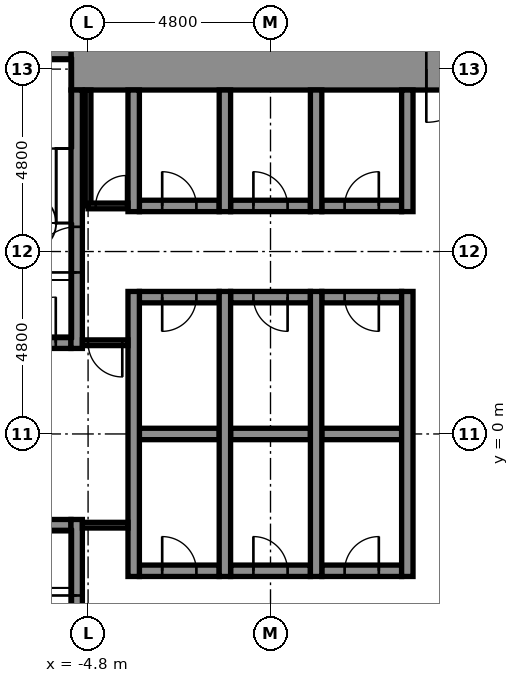
"""IFC4 building model, lengths in metres.
Left out: names, types, materials, properties, quantities, classifications, styles, units other than length and angle.
Written with IfcOpenShell. Run it as: python <this file> out.ifc"""

import sys

from ifc_helpers import new_model, si_unit, direction, frame, frame_2d, origin, place, context, subcontext, project, spatial, rectangle, extrude, element, fill, save


model = new_model("IFC4")
c1 = context("Model", 3, precision=1e-05, world=origin(), true_north=direction((0.0, 1.0)))
c2 = subcontext(c1, "Body", "Model", "MODEL_VIEW")
j1 = project(units=[si_unit("LENGTHUNIT", "METRE"), si_unit("PLANEANGLEUNIT", "RADIAN")], contexts=[c1])
p1 = place(None, origin())
s1 = spatial("IfcSite", under=j1, at=p1, CompositionType="ELEMENT")
p2 = place(p1, origin())
s2 = spatial("IfcBuilding", under=s1, at=p2, CompositionType="ELEMENT")
p3 = place(p2, frame((0.0, 0.0, 12.4)))
s3 = spatial("IfcBuildingStorey", under=s2, at=p3, CompositionType="ELEMENT", Elevation=12.4)
p4 = place(p3, frame((-3.45, -3.6, -0.3), z_axis=(0.0, 0.0, 1.0), x_axis=(1.0, 0.0, 0.0)))
e1 = element("IfcWall", 1, at=p4, inside=s3, PredefinedType="STANDARD", context=c2, shape_type="SweptSolid", body=[
    extrude(rectangle(XDim=2.1, YDim=0.3, at=frame_2d((1.05, 0.0))), origin(), (0.0, 0.0, 1.0), 5.05),
])
p5 = place(p4, frame((0.6, 0.0, 0.3)))
e2 = element("IfcOpeningElement", 2, at=p5, cuts=e1, PredefinedType="OPENING", context=c2, shape_type="SweptSolid", body=[
    extrude(rectangle(XDim=0.9, YDim=2.1, at=frame_2d((0.45, 1.05))), frame((0.0, 0.16, 0.0), z_axis=(0.0, -1.0, 0.0), x_axis=(1.0, 0.0, 0.0)), (0.0, 0.0, 1.0), 0.32),
])
p6 = place(p3, frame((-1.05, -3.6, -0.3), z_axis=(0.0, 0.0, 1.0), x_axis=(1.0, 0.0, 0.0)))
e3 = element("IfcWall", 3, at=p6, inside=s3, PredefinedType="STANDARD", context=c2, shape_type="SweptSolid", body=[
    extrude(rectangle(XDim=2.1, YDim=0.3, at=frame_2d((1.05, 0.0))), origin(), (0.0, 0.0, 1.0), 5.05),
])
p7 = place(p6, frame((0.6, 0.0, 0.3)))
e4 = element("IfcOpeningElement", 4, at=p7, cuts=e3, PredefinedType="OPENING", context=c2, shape_type="SweptSolid", body=[
    extrude(rectangle(XDim=0.9, YDim=2.1, at=frame_2d((0.45, 1.05))), frame((0.0, 0.16, 0.0), z_axis=(0.0, -1.0, 0.0), x_axis=(1.0, 0.0, 0.0)), (0.0, 0.0, 1.0), 0.32),
])
p8 = place(p3, frame((1.35, -3.6, -0.3), z_axis=(0.0, 0.0, 1.0), x_axis=(1.0, 0.0, 0.0)))
e5 = element("IfcWall", 5, at=p8, inside=s3, PredefinedType="STANDARD", context=c2, shape_type="SweptSolid", body=[
    extrude(rectangle(XDim=2.1, YDim=0.3, at=frame_2d((1.05, 0.0))), origin(), (0.0, 0.0, 1.0), 5.05),
])
p9 = place(p8, frame((0.6, 0.0, 0.3)))
e6 = element("IfcOpeningElement", 6, at=p9, cuts=e5, PredefinedType="OPENING", context=c2, shape_type="SweptSolid", body=[
    extrude(rectangle(XDim=0.9, YDim=2.1, at=frame_2d((0.45, 1.05))), frame((0.0, 0.16, 0.0), z_axis=(0.0, -1.0, 0.0), x_axis=(1.0, 0.0, 0.0)), (0.0, 0.0, 1.0), 0.32),
])
p10 = place(p3, frame((-7.25, -2.4, -0.3), z_axis=(0.0, 0.0, 1.0), x_axis=(1.0, 0.0, 0.0)))
e7 = element("IfcWall", 7, at=p10, inside=s3, PredefinedType="STANDARD", context=c2, shape_type="SweptSolid", body=[
    extrude(rectangle(XDim=2.0, YDim=0.3, at=frame_2d((1.0, 0.0))), origin(), (0.0, 0.0, 1.0), 5.05),
])
p11 = place(p3, frame((-3.45, 0.0, -0.3), z_axis=(0.0, 0.0, 1.0), x_axis=(1.0, 0.0, 0.0)))
e8 = element("IfcWall", 8, at=p11, inside=s3, PredefinedType="STANDARD", context=c2, shape_type="SweptSolid", body=[
    extrude(rectangle(XDim=2.1, YDim=0.3, at=frame_2d((1.05, 0.0))), origin(), (0.0, 0.0, 1.0), 5.05),
])
p12 = place(p3, frame((-1.05, 0.0, -0.3), z_axis=(0.0, 0.0, 1.0), x_axis=(1.0, 0.0, 0.0)))
e9 = element("IfcWall", 9, at=p12, inside=s3, PredefinedType="STANDARD", context=c2, shape_type="SweptSolid", body=[
    extrude(rectangle(XDim=2.1, YDim=0.3, at=frame_2d((1.05, 0.0))), origin(), (0.0, 0.0, 1.0), 5.05),
])
p13 = place(p3, frame((1.35, 0.0, -0.3), z_axis=(0.0, 0.0, 1.0), x_axis=(1.0, 0.0, 0.0)))
e10 = element("IfcWall", 10, at=p13, inside=s3, PredefinedType="STANDARD", context=c2, shape_type="SweptSolid", body=[
    extrude(rectangle(XDim=2.1, YDim=0.3, at=frame_2d((1.05, 0.0))), origin(), (0.0, 0.0, 1.0), 5.05),
])
p14 = place(p3, frame((-7.25, 2.4, -0.3), z_axis=(0.0, 0.0, 1.0), x_axis=(1.0, 0.0, 0.0)))
e11 = element("IfcWall", 11, at=p14, inside=s3, PredefinedType="STANDARD", context=c2, shape_type="SweptSolid", body=[
    extrude(rectangle(XDim=2.0, YDim=0.3, at=frame_2d((1.0, 0.0))), origin(), (0.0, 0.0, 1.0), 5.05),
])
p15 = place(p14, frame((0.4, 0.0, 0.3)))
e12 = element("IfcOpeningElement", 12, at=p15, cuts=e11, PredefinedType="OPENING", context=c2, shape_type="SweptSolid", body=[
    extrude(rectangle(XDim=1.2, YDim=2.1, at=frame_2d((0.6, 1.05))), frame((0.0, 0.16, 0.0), z_axis=(0.0, -1.0, 0.0), x_axis=(1.0, 0.0, 0.0)), (0.0, 0.0, 1.0), 0.32),
])
p16 = place(p3, frame((-3.45, 3.6, -0.3), z_axis=(0.0, 0.0, 1.0), x_axis=(1.0, 0.0, 0.0)))
e13 = element("IfcWall", 13, at=p16, inside=s3, PredefinedType="STANDARD", context=c2, shape_type="SweptSolid", body=[
    extrude(rectangle(XDim=2.1, YDim=0.3, at=frame_2d((1.05, 0.0))), origin(), (0.0, 0.0, 1.0), 5.05),
])
p17 = place(p16, frame((0.6, 0.0, 0.3)))
e14 = element("IfcOpeningElement", 14, at=p17, cuts=e13, PredefinedType="OPENING", context=c2, shape_type="SweptSolid", body=[
    extrude(rectangle(XDim=0.9, YDim=2.1, at=frame_2d((0.45, 1.05))), frame((0.0, 0.16, 0.0), z_axis=(0.0, -1.0, 0.0), x_axis=(1.0, 0.0, 0.0)), (0.0, 0.0, 1.0), 0.32),
])
p18 = place(p3, frame((-1.05, 3.6, -0.3), z_axis=(0.0, 0.0, 1.0), x_axis=(1.0, 0.0, 0.0)))
e15 = element("IfcWall", 15, at=p18, inside=s3, PredefinedType="STANDARD", context=c2, shape_type="SweptSolid", body=[
    extrude(rectangle(XDim=2.1, YDim=0.3, at=frame_2d((1.05, 0.0))), origin(), (0.0, 0.0, 1.0), 5.05),
])
p19 = place(p18, frame((0.6, 0.0, 0.3)))
e16 = element("IfcOpeningElement", 16, at=p19, cuts=e15, PredefinedType="OPENING", context=c2, shape_type="SweptSolid", body=[
    extrude(rectangle(XDim=0.9, YDim=2.1, at=frame_2d((0.45, 1.05))), frame((0.0, 0.16, 0.0), z_axis=(0.0, -1.0, 0.0), x_axis=(1.0, 0.0, 0.0)), (0.0, 0.0, 1.0), 0.32),
])
p20 = place(p3, frame((1.35, 3.6, -0.3), z_axis=(0.0, 0.0, 1.0), x_axis=(1.0, 0.0, 0.0)))
e17 = element("IfcWall", 17, at=p20, inside=s3, PredefinedType="STANDARD", context=c2, shape_type="SweptSolid", body=[
    extrude(rectangle(XDim=2.1, YDim=0.3, at=frame_2d((1.05, 0.0))), origin(), (0.0, 0.0, 1.0), 5.05),
])
p21 = place(p20, frame((0.6, 0.0, 0.3)))
e18 = element("IfcOpeningElement", 18, at=p21, cuts=e17, PredefinedType="OPENING", context=c2, shape_type="SweptSolid", body=[
    extrude(rectangle(XDim=0.9, YDim=2.1, at=frame_2d((0.45, 1.05))), frame((0.0, 0.16, 0.0), z_axis=(0.0, -1.0, 0.0), x_axis=(1.0, 0.0, 0.0)), (0.0, 0.0, 1.0), 0.32),
])
p22 = place(p3, frame((-3.45, 6.0, -0.3), z_axis=(0.0, 0.0, 1.0), x_axis=(1.0, 0.0, 0.0)))
e19 = element("IfcWall", 19, at=p22, inside=s3, PredefinedType="STANDARD", context=c2, shape_type="SweptSolid", body=[
    extrude(rectangle(XDim=2.1, YDim=0.3, at=frame_2d((1.05, 0.0))), origin(), (0.0, 0.0, 1.0), 5.05),
])
p23 = place(p22, frame((0.6, 0.0, 0.3)))
e20 = element("IfcOpeningElement", 20, at=p23, cuts=e19, PredefinedType="OPENING", context=c2, shape_type="SweptSolid", body=[
    extrude(rectangle(XDim=0.9, YDim=2.1, at=frame_2d((0.45, 1.05))), frame((0.0, 0.16, 0.0), z_axis=(0.0, -1.0, 0.0), x_axis=(1.0, 0.0, 0.0)), (0.0, 0.0, 1.0), 0.32),
])
p24 = place(p3, frame((-1.05, 6.0, -0.3), z_axis=(0.0, 0.0, 1.0), x_axis=(1.0, 0.0, 0.0)))
e21 = element("IfcWall", 21, at=p24, inside=s3, PredefinedType="STANDARD", context=c2, shape_type="SweptSolid", body=[
    extrude(rectangle(XDim=2.1, YDim=0.3, at=frame_2d((1.05, 0.0))), origin(), (0.0, 0.0, 1.0), 5.05),
])
p25 = place(p24, frame((0.6, 0.0, 0.3)))
e22 = element("IfcOpeningElement", 22, at=p25, cuts=e21, PredefinedType="OPENING", context=c2, shape_type="SweptSolid", body=[
    extrude(rectangle(XDim=0.9, YDim=2.1, at=frame_2d((0.45, 1.05))), frame((0.0, 0.16, 0.0), z_axis=(0.0, -1.0, 0.0), x_axis=(1.0, 0.0, 0.0)), (0.0, 0.0, 1.0), 0.32),
])
p26 = place(p3, frame((1.35, 6.0, -0.3), z_axis=(0.0, 0.0, 1.0), x_axis=(1.0, 0.0, 0.0)))
e23 = element("IfcWall", 23, at=p26, inside=s3, PredefinedType="STANDARD", context=c2, shape_type="SweptSolid", body=[
    extrude(rectangle(XDim=2.1, YDim=0.3, at=frame_2d((1.05, 0.0))), origin(), (0.0, 0.0, 1.0), 5.05),
])
p27 = place(p26, frame((0.6, 0.0, 0.3)))
e24 = element("IfcOpeningElement", 24, at=p27, cuts=e23, PredefinedType="OPENING", context=c2, shape_type="SweptSolid", body=[
    extrude(rectangle(XDim=0.9, YDim=2.1, at=frame_2d((0.45, 1.05))), frame((0.0, 0.16, 0.0), z_axis=(0.0, -1.0, 0.0), x_axis=(1.0, 0.0, 0.0)), (0.0, 0.0, 1.0), 0.32),
])
p28 = place(p3, frame((-5.25, 9.6, -0.3), z_axis=(0.0, 0.0, 1.0), x_axis=(1.0, 0.0, 0.0)))
e25 = element("IfcWall", 25, at=p28, inside=s3, PredefinedType="SHEAR", context=c2, shape_type="SweptSolid", body=[
    extrude(rectangle(XDim=14.3, YDim=1.1, at=frame_2d((7.15, 0.0))), origin(), (0.0, 0.0, 1.0), 5.05),
])
p29 = place(p28, frame((9.35, 0.0, 0.3)))
e26 = element("IfcOpeningElement", 26, at=p29, cuts=e25, PredefinedType="OPENING", context=c2, shape_type="SweptSolid", body=[
    extrude(rectangle(XDim=1.4, YDim=2.1, at=frame_2d((0.7, 1.05))), frame((0.0, 0.56, 0.0), z_axis=(0.0, -1.0, 0.0), x_axis=(1.0, 0.0, 0.0)), (0.0, 0.0, 1.0), 1.12),
])
p30 = place(p3, frame((-9.05, 10.0, -0.3), z_axis=(0.0, 0.0, 1.0), x_axis=(1.0, 0.0, 0.0)))
e27 = element("IfcWall", 27, at=p30, inside=s3, PredefinedType="STANDARD", context=c2, shape_type="SweptSolid", body=[
    extrude(rectangle(XDim=3.8, YDim=0.3, at=frame_2d((1.9, 0.0))), origin(), (0.0, 0.0, 1.0), 5.05),
])
p31 = place(p3, frame((-5.1, -9.05, -0.3), z_axis=(0.0, 0.0, 1.0), x_axis=(0.0, 1.0, 0.0)))
e28 = element("IfcWall", 28, at=p31, inside=s3, PredefinedType="STANDARD", context=c2, shape_type="SweptSolid", body=[
    extrude(rectangle(XDim=6.8, YDim=0.3, at=frame_2d((3.4, 0.0))), origin(), (0.0, 0.0, 1.0), 5.05),
])
p32 = place(p31, frame((3.6, 0.0, 0.3)))
e29 = element("IfcOpeningElement", 29, at=p32, cuts=e28, PredefinedType="OPENING", context=c2, shape_type="SweptSolid", body=[
    extrude(rectangle(XDim=1.2, YDim=2.1, at=frame_2d((0.6, 1.05))), frame((0.0, 0.16, 0.0), z_axis=(0.0, -1.0, 0.0), x_axis=(1.0, 0.0, 0.0)), (0.0, 0.0, 1.0), 0.32),
])
p33 = place(p3, frame((-5.1, 2.25, -0.3), z_axis=(0.0, 0.0, 1.0), x_axis=(0.0, 1.0, 0.0)))
e30 = element("IfcWall", 30, at=p33, inside=s3, PredefinedType="STANDARD", context=c2, shape_type="SweptSolid", body=[
    extrude(rectangle(XDim=6.8, YDim=0.3, at=frame_2d((3.4, 0.0))), origin(), (0.0, 0.0, 1.0), 5.05),
])
p34 = place(p33, frame((2.0, 0.0, 0.3)))
e31 = element("IfcOpeningElement", 31, at=p34, cuts=e30, PredefinedType="OPENING", context=c2, shape_type="SweptSolid", body=[
    extrude(rectangle(XDim=1.2, YDim=2.1, at=frame_2d((0.6, 1.05))), frame((0.0, 0.16, 0.0), z_axis=(0.0, -1.0, 0.0), x_axis=(1.0, 0.0, 0.0)), (0.0, 0.0, 1.0), 0.32),
])
p35 = place(p3, frame((-3.6, -3.75, -0.3), z_axis=(0.0, 0.0, 1.0), x_axis=(0.0, 1.0, 0.0)))
e32 = element("IfcWall", 32, at=p35, inside=s3, PredefinedType="STANDARD", context=c2, shape_type="SweptSolid", body=[
    extrude(rectangle(XDim=7.5, YDim=0.3, at=frame_2d((3.75, 0.0))), origin(), (0.0, 0.0, 1.0), 5.05),
])
p36 = place(p3, frame((-3.6, 5.85, -0.3), z_axis=(0.0, 0.0, 1.0), x_axis=(0.0, 1.0, 0.0)))
e33 = element("IfcWall", 33, at=p36, inside=s3, PredefinedType="STANDARD", context=c2, shape_type="SweptSolid", body=[
    extrude(rectangle(XDim=3.2, YDim=0.3, at=frame_2d((1.6, 0.0))), origin(), (0.0, 0.0, 1.0), 5.05),
])
p37 = place(p3, frame((-1.2, -3.75, -0.3), z_axis=(0.0, 0.0, 1.0), x_axis=(0.0, 1.0, 0.0)))
e34 = element("IfcWall", 34, at=p37, inside=s3, PredefinedType="STANDARD", context=c2, shape_type="SweptSolid", body=[
    extrude(rectangle(XDim=7.5, YDim=0.3, at=frame_2d((3.75, 0.0))), origin(), (0.0, 0.0, 1.0), 5.05),
])
p38 = place(p3, frame((-1.2, 5.85, -0.3), z_axis=(0.0, 0.0, 1.0), x_axis=(0.0, 1.0, 0.0)))
e35 = element("IfcWall", 35, at=p38, inside=s3, PredefinedType="STANDARD", context=c2, shape_type="SweptSolid", body=[
    extrude(rectangle(XDim=3.2, YDim=0.3, at=frame_2d((1.6, 0.0))), origin(), (0.0, 0.0, 1.0), 5.05),
])
p39 = place(p3, frame((1.2, -3.75, -0.3), z_axis=(0.0, 0.0, 1.0), x_axis=(0.0, 1.0, 0.0)))
e36 = element("IfcWall", 36, at=p39, inside=s3, PredefinedType="STANDARD", context=c2, shape_type="SweptSolid", body=[
    extrude(rectangle(XDim=7.5, YDim=0.3, at=frame_2d((3.75, 0.0))), origin(), (0.0, 0.0, 1.0), 5.05),
])
p40 = place(p3, frame((1.2, 5.85, -0.3), z_axis=(0.0, 0.0, 1.0), x_axis=(0.0, 1.0, 0.0)))
e37 = element("IfcWall", 37, at=p40, inside=s3, PredefinedType="STANDARD", context=c2, shape_type="SweptSolid", body=[
    extrude(rectangle(XDim=3.2, YDim=0.3, at=frame_2d((1.6, 0.0))), origin(), (0.0, 0.0, 1.0), 5.05),
])
p41 = place(p3, frame((3.6, -3.75, -0.3), z_axis=(0.0, 0.0, 1.0), x_axis=(0.0, 1.0, 0.0)))
e38 = element("IfcWall", 38, at=p41, inside=s3, PredefinedType="STANDARD", context=c2, shape_type="SweptSolid", body=[
    extrude(rectangle(XDim=7.5, YDim=0.3, at=frame_2d((3.75, 0.0))), origin(), (0.0, 0.0, 1.0), 5.05),
])
p42 = place(p3, frame((3.6, 5.85, -0.3), z_axis=(0.0, 0.0, 1.0), x_axis=(0.0, 1.0, 0.0)))
e39 = element("IfcWall", 39, at=p42, inside=s3, PredefinedType="STANDARD", context=c2, shape_type="SweptSolid", body=[
    extrude(rectangle(XDim=3.2, YDim=0.3, at=frame_2d((1.6, 0.0))), origin(), (0.0, 0.0, 1.0), 5.05),
])
p43 = place(p3, frame((-4.8, 6.0, 0.0), z_axis=(0.0, 0.0, 1.0), x_axis=(0.0, 1.0, 0.0)))
e40 = element("IfcWall", 40, at=p43, inside=s3, PredefinedType="PARTITIONING", context=c2, shape_type="SweptSolid", body=[
    extrude(rectangle(XDim=3.05, YDim=0.15, at=frame_2d((1.525, 0.0))), origin(), (0.0, 0.0, 1.0), 4.7),
])
p44 = place(p3, frame((-4.8, 6.0, 0.0), z_axis=(0.0, 0.0, 1.0), x_axis=(1.0, 0.0, 0.0)))
e41 = element("IfcWall", 41, at=p44, inside=s3, PredefinedType="PARTITIONING", context=c2, shape_type="SweptSolid", body=[
    extrude(rectangle(XDim=1.05, YDim=0.15, at=frame_2d((0.525, 0.0))), origin(), (0.0, 0.0, 1.0), 4.7),
])
p45 = place(p44, frame((0.2, 0.0, 0.0)))
e42 = element("IfcOpeningElement", 42, at=p45, cuts=e41, PredefinedType="OPENING", context=c2, shape_type="SweptSolid", body=[
    extrude(rectangle(XDim=0.8, YDim=2.1, at=frame_2d((0.4, 1.05))), frame((0.0, 0.085, 0.0), z_axis=(0.0, -1.0, 0.0), x_axis=(1.0, 0.0, 0.0)), (0.0, 0.0, 1.0), 0.17),
])
p46 = place(p3, frame((-4.95, 2.4, 0.0), z_axis=(0.0, 0.0, 1.0), x_axis=(1.0, 0.0, 0.0)))
e43 = element("IfcWall", 43, at=p46, inside=s3, PredefinedType="PARTITIONING", context=c2, shape_type="SweptSolid", body=[
    extrude(rectangle(XDim=1.2, YDim=0.15, at=frame_2d((0.6, 0.0))), origin(), (0.0, 0.0, 1.0), 4.75),
])
p47 = place(p46, frame((0.15, 0.0, 0.0)))
e44 = element("IfcOpeningElement", 44, at=p47, cuts=e43, PredefinedType="OPENING", context=c2, shape_type="SweptSolid", body=[
    extrude(rectangle(XDim=0.9, YDim=2.1, at=frame_2d((0.45, 1.05))), frame((0.0, 0.085, 0.0), z_axis=(0.0, -1.0, 0.0), x_axis=(1.0, 0.0, 0.0)), (0.0, 0.0, 1.0), 0.17),
])
p48 = place(p3, frame((-4.95, -2.4, 0.0), z_axis=(0.0, 0.0, 1.0), x_axis=(1.0, 0.0, 0.0)))
e45 = element("IfcWall", 45, at=p48, inside=s3, PredefinedType="PARTITIONING", context=c2, shape_type="SweptSolid", body=[
    extrude(rectangle(XDim=1.2, YDim=0.15, at=frame_2d((0.6, 0.0))), origin(), (0.0, 0.0, 1.0), 4.75),
])
p49 = place(p45, origin())
e46 = element("IfcDoor", 46, at=p49, inside=s3, OperationType="SINGLE_SWING_RIGHT", PredefinedType="DOOR", context=c2, shape_type="SweptSolid", body=[
    extrude(rectangle(XDim=0.8, YDim=2.1, at=frame_2d((0.4, 1.05))), frame((0.0, 0.025, 0.0), z_axis=(0.0, -1.0, 0.0), x_axis=(1.0, 0.0, 0.0)), (0.0, 0.0, 1.0), 0.05),
])
fill(e42, e46)
p50 = place(p34, origin())
e47 = element("IfcDoor", 47, at=p50, inside=s3, OperationType="SINGLE_SWING_LEFT", PredefinedType="DOOR", context=c2, shape_type="SweptSolid", body=[
    extrude(rectangle(XDim=1.2, YDim=2.1, at=frame_2d((0.6, 1.05))), frame((0.0, 0.025, 0.0), z_axis=(0.0, -1.0, 0.0), x_axis=(1.0, 0.0, 0.0)), (0.0, 0.0, 1.0), 0.05),
])
fill(e31, e47)
p51 = place(p32, origin())
e48 = element("IfcDoor", 48, at=p51, inside=s3, OperationType="SINGLE_SWING_RIGHT", PredefinedType="DOOR", context=c2, shape_type="SweptSolid", body=[
    extrude(rectangle(XDim=1.2, YDim=2.1, at=frame_2d((0.6, 1.05))), frame((0.0, 0.025, 0.0), z_axis=(0.0, -1.0, 0.0), x_axis=(1.0, 0.0, 0.0)), (0.0, 0.0, 1.0), 0.05),
])
fill(e29, e48)
p52 = place(p23, origin())
e49 = element("IfcDoor", 49, at=p52, inside=s3, OperationType="SINGLE_SWING_LEFT", PredefinedType="DOOR", context=c2, shape_type="SweptSolid", body=[
    extrude(rectangle(XDim=0.9, YDim=2.1, at=frame_2d((0.45, 1.05))), frame((0.0, 0.025, 0.0), z_axis=(0.0, -1.0, 0.0), x_axis=(1.0, 0.0, 0.0)), (0.0, 0.0, 1.0), 0.05),
])
fill(e20, e49)
p53 = place(p25, origin())
e50 = element("IfcDoor", 50, at=p53, inside=s3, OperationType="SINGLE_SWING_LEFT", PredefinedType="DOOR", context=c2, shape_type="SweptSolid", body=[
    extrude(rectangle(XDim=0.9, YDim=2.1, at=frame_2d((0.45, 1.05))), frame((0.0, 0.025, 0.0), z_axis=(0.0, -1.0, 0.0), x_axis=(1.0, 0.0, 0.0)), (0.0, 0.0, 1.0), 0.05),
])
fill(e22, e50)
p54 = place(p27, origin())
e51 = element("IfcDoor", 51, at=p54, inside=s3, OperationType="SINGLE_SWING_RIGHT", PredefinedType="DOOR", context=c2, shape_type="SweptSolid", body=[
    extrude(rectangle(XDim=0.9, YDim=2.1, at=frame_2d((0.45, 1.05))), frame((0.0, 0.025, 0.0), z_axis=(0.0, -1.0, 0.0), x_axis=(1.0, 0.0, 0.0)), (0.0, 0.0, 1.0), 0.05),
])
fill(e24, e51)
p55 = place(p17, frame((0.9, 0.0, 0.0), z_axis=(0.0, 0.0, 1.0), x_axis=(-1.0, 0.0, 0.0)))
e52 = element("IfcDoor", 52, at=p55, inside=s3, OperationType="SINGLE_SWING_LEFT", PredefinedType="DOOR", context=c2, shape_type="SweptSolid", body=[
    extrude(rectangle(XDim=0.9, YDim=2.1, at=frame_2d((0.45, 1.05))), frame((0.0, 0.025, 0.0), z_axis=(0.0, -1.0, 0.0), x_axis=(1.0, 0.0, 0.0)), (0.0, 0.0, 1.0), 0.05),
])
fill(e14, e52)
p56 = place(p19, frame((0.9, 0.0, 0.0), z_axis=(0.0, 0.0, 1.0), x_axis=(-1.0, 0.0, 0.0)))
e53 = element("IfcDoor", 53, at=p56, inside=s3, OperationType="SINGLE_SWING_RIGHT", PredefinedType="DOOR", context=c2, shape_type="SweptSolid", body=[
    extrude(rectangle(XDim=0.9, YDim=2.1, at=frame_2d((0.45, 1.05))), frame((0.0, 0.025, 0.0), z_axis=(0.0, -1.0, 0.0), x_axis=(1.0, 0.0, 0.0)), (0.0, 0.0, 1.0), 0.05),
])
fill(e16, e53)
p57 = place(p21, frame((0.9, 0.0, 0.0), z_axis=(0.0, 0.0, 1.0), x_axis=(-1.0, 0.0, 0.0)))
e54 = element("IfcDoor", 54, at=p57, inside=s3, OperationType="SINGLE_SWING_RIGHT", PredefinedType="DOOR", context=c2, shape_type="SweptSolid", body=[
    extrude(rectangle(XDim=0.9, YDim=2.1, at=frame_2d((0.45, 1.05))), frame((0.0, 0.025, 0.0), z_axis=(0.0, -1.0, 0.0), x_axis=(1.0, 0.0, 0.0)), (0.0, 0.0, 1.0), 0.05),
])
fill(e18, e54)
p58 = place(p5, origin())
e55 = element("IfcDoor", 55, at=p58, inside=s3, OperationType="SINGLE_SWING_LEFT", PredefinedType="DOOR", context=c2, shape_type="SweptSolid", body=[
    extrude(rectangle(XDim=0.9, YDim=2.1, at=frame_2d((0.45, 1.05))), frame((0.0, 0.025, 0.0), z_axis=(0.0, -1.0, 0.0), x_axis=(1.0, 0.0, 0.0)), (0.0, 0.0, 1.0), 0.05),
])
fill(e2, e55)
p59 = place(p7, origin())
e56 = element("IfcDoor", 56, at=p59, inside=s3, OperationType="SINGLE_SWING_LEFT", PredefinedType="DOOR", context=c2, shape_type="SweptSolid", body=[
    extrude(rectangle(XDim=0.9, YDim=2.1, at=frame_2d((0.45, 1.05))), frame((0.0, 0.025, 0.0), z_axis=(0.0, -1.0, 0.0), x_axis=(1.0, 0.0, 0.0)), (0.0, 0.0, 1.0), 0.05),
])
fill(e4, e56)
p60 = place(p9, origin())
e57 = element("IfcDoor", 57, at=p60, inside=s3, OperationType="SINGLE_SWING_RIGHT", PredefinedType="DOOR", context=c2, shape_type="SweptSolid", body=[
    extrude(rectangle(XDim=0.9, YDim=2.1, at=frame_2d((0.45, 1.05))), frame((0.0, 0.025, 0.0), z_axis=(0.0, -1.0, 0.0), x_axis=(1.0, 0.0, 0.0)), (0.0, 0.0, 1.0), 0.05),
])
fill(e6, e57)
p61 = place(p29, frame((1.4, 0.0, 0.0), z_axis=(0.0, 0.0, 1.0), x_axis=(-1.0, 0.0, 0.0)))
e58 = element("IfcDoor", 58, at=p61, inside=s3, OperationType="SINGLE_SWING_LEFT", PredefinedType="DOOR", context=c2, shape_type="SweptSolid", body=[
    extrude(rectangle(XDim=1.4, YDim=2.1, at=frame_2d((0.7, 1.05))), frame((0.0, 0.025, 0.0), z_axis=(0.0, -1.0, 0.0), x_axis=(1.0, 0.0, 0.0)), (0.0, 0.0, 1.0), 0.05),
])
fill(e26, e58)
p62 = place(p47, frame((0.9, 0.0, 0.0), z_axis=(0.0, 0.0, 1.0), x_axis=(-1.0, 0.0, 0.0)))
e59 = element("IfcDoor", 59, at=p62, inside=s3, OperationType="SINGLE_SWING_RIGHT", PredefinedType="DOOR", context=c2, shape_type="SweptSolid", body=[
    extrude(rectangle(XDim=0.9, YDim=2.1, at=frame_2d((0.45, 1.05))), frame((0.0, 0.025, 0.0), z_axis=(0.0, -1.0, 0.0), x_axis=(1.0, 0.0, 0.0)), (0.0, 0.0, 1.0), 0.05),
])
fill(e44, e59)
p63 = place(p15, origin())
e60 = element("IfcDoor", 60, at=p63, inside=s3, OperationType="SINGLE_SWING_RIGHT", PredefinedType="DOOR", context=c2, shape_type="SweptSolid", body=[
    extrude(rectangle(XDim=1.2, YDim=2.1, at=frame_2d((0.6, 1.05))), frame((0.0, 0.025, 0.0), z_axis=(0.0, -1.0, 0.0), x_axis=(1.0, 0.0, 0.0)), (0.0, 0.0, 1.0), 0.05),
])
fill(e12, e60)
save(model, sys.argv[1])
